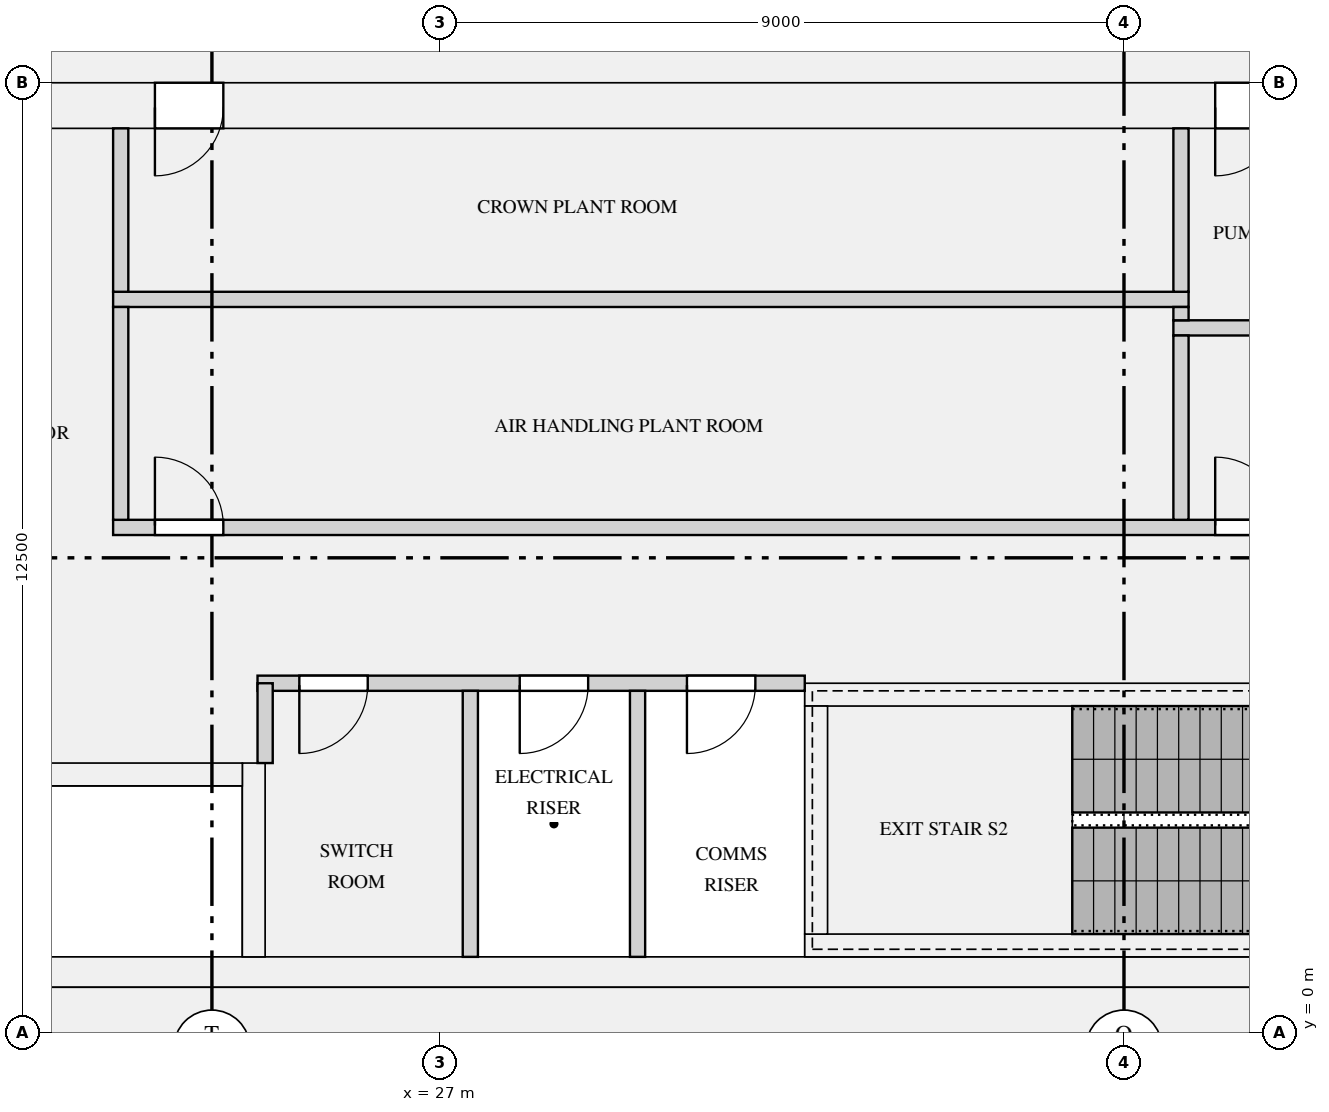
"""IFC4 building model, lengths in metres.
Left out: names, types, materials, properties, quantities, classifications, styles, units other than length and angle.
Written with IfcOpenShell. Run it as: python <this file> out.ifc"""

import sys

from ifc_helpers import new_model, si_unit, direction, frame, frame_2d, origin, place, context, subcontext, project, spatial, rectangle, extrude, element, fill, save


model = new_model("IFC4")
c1 = context("Model", 3, precision=1e-05, world=origin(), true_north=direction((0.0, 1.0)))
c2 = subcontext(c1, "Body", "Model", "MODEL_VIEW")
j1 = project(units=[si_unit("LENGTHUNIT", "METRE"), si_unit("PLANEANGLEUNIT", "RADIAN")], contexts=[c1])
p1 = place(None, origin())
s1 = spatial("IfcSite", under=j1, at=p1, CompositionType="ELEMENT")
p2 = place(p1, origin())
s2 = spatial("IfcBuilding", under=s1, at=p2, CompositionType="ELEMENT")
p3 = place(p2, frame((0.0, 0.0, 235.8)))
s3 = spatial("IfcBuildingStorey", under=s2, at=p3, CompositionType="ELEMENT", Elevation=235.8)
p4 = place(p3, frame((18.6, 0.3, 0.0), z_axis=(0.0, 0.0, 1.0), x_axis=(1.0, 0.0, 0.0)))
e1 = element("IfcWall", 1, at=p4, inside=s3, PredefinedType="SHEAR", context=c2, shape_type="SweptSolid", body=[
    extrude(rectangle(XDim=34.8, YDim=0.6, at=frame_2d((17.4, 0.0))), origin(), (0.0, 0.0, 1.0), 4.2),
])
p5 = place(p3, frame((18.6, 12.2, 0.0), z_axis=(0.0, 0.0, 1.0), x_axis=(1.0, 0.0, 0.0)))
e2 = element("IfcWall", 2, at=p5, inside=s3, PredefinedType="SHEAR", context=c2, shape_type="SweptSolid", body=[
    extrude(rectangle(XDim=34.8, YDim=0.6, at=frame_2d((17.4, 0.0))), origin(), (0.0, 0.0, 1.0), 4.2),
])
p6 = place(p5, frame((24.575, 0.0, 0.0)))
e3 = element("IfcOpeningElement", 3, at=p6, cuts=e2, PredefinedType="OPENING", context=c2, shape_type="SweptSolid", body=[
    extrude(rectangle(XDim=1.1, YDim=2.1, at=frame_2d((0.55, 1.05))), frame((0.0, 0.31, 0.0), z_axis=(0.0, -1.0, 0.0), x_axis=(1.0, 0.0, 0.0)), (0.0, 0.0, 1.0), 0.62),
])
p7 = place(p5, frame((26.825, 0.0, 0.0)))
e4 = element("IfcOpeningElement", 4, at=p7, cuts=e2, PredefinedType="OPENING", context=c2, shape_type="SweptSolid", body=[
    extrude(rectangle(XDim=1.1, YDim=2.1, at=frame_2d((0.55, 1.05))), frame((0.0, 0.31, 0.0), z_axis=(0.0, -1.0, 0.0), x_axis=(1.0, 0.0, 0.0)), (0.0, 0.0, 1.0), 0.62),
])
p8 = place(p5, frame((29.075, 0.0, 0.0)))
e5 = element("IfcOpeningElement", 5, at=p8, cuts=e2, PredefinedType="OPENING", context=c2, shape_type="SweptSolid", body=[
    extrude(rectangle(XDim=1.1, YDim=2.1, at=frame_2d((0.55, 1.05))), frame((0.0, 0.31, 0.0), z_axis=(0.0, -1.0, 0.0), x_axis=(1.0, 0.0, 0.0)), (0.0, 0.0, 1.0), 0.62),
])
p9 = place(p5, frame((18.6, 0.0, 0.0)))
e6 = element("IfcOpeningElement", 6, at=p9, cuts=e2, PredefinedType="OPENING", context=c2, shape_type="SweptSolid", body=[
    extrude(rectangle(XDim=0.9, YDim=2.1, at=frame_2d((0.45, 1.05))), frame((0.0, 0.31, 0.0), z_axis=(0.0, -1.0, 0.0), x_axis=(1.0, 0.0, 0.0)), (0.0, 0.0, 1.0), 0.62),
])
p10 = place(p5, frame((4.65, 0.0, 0.0)))
e7 = element("IfcOpeningElement", 7, at=p10, cuts=e2, PredefinedType="OPENING", context=c2, shape_type="SweptSolid", body=[
    extrude(rectangle(XDim=0.9, YDim=2.1, at=frame_2d((0.45, 1.05))), frame((0.0, 0.31, 0.0), z_axis=(0.0, -1.0, 0.0), x_axis=(1.0, 0.0, 0.0)), (0.0, 0.0, 1.0), 0.62),
])
p11 = place(p5, frame((1.55, 0.0, 0.0)))
e8 = element("IfcOpeningElement", 8, at=p11, cuts=e2, PredefinedType="OPENING", context=c2, shape_type="SweptSolid", body=[
    extrude(rectangle(XDim=1.2, YDim=2.1, at=frame_2d((0.6, 1.05))), frame((0.0, 0.31, 0.0), z_axis=(0.0, -1.0, 0.0), x_axis=(1.0, 0.0, 0.0)), (0.0, 0.0, 1.0), 0.62),
])
p12 = place(p5, frame((32.05, 0.0, 0.0)))
e9 = element("IfcOpeningElement", 9, at=p12, cuts=e2, PredefinedType="OPENING", context=c2, shape_type="SweptSolid", body=[
    extrude(rectangle(XDim=1.2, YDim=2.1, at=frame_2d((0.6, 1.05))), frame((0.0, 0.31, 0.0), z_axis=(0.0, -1.0, 0.0), x_axis=(1.0, 0.0, 0.0)), (0.0, 0.0, 1.0), 0.62),
])
p13 = place(p3, frame((18.6, 0.8, 0.0), z_axis=(0.0, 0.0, 1.0), x_axis=(1.0, 0.0, 0.0)))
e10 = element("IfcWall", 10, at=p13, inside=s3, PredefinedType="SHEAR", context=c2, shape_type="SweptSolid", body=[
    extrude(rectangle(XDim=34.8, YDim=0.4, at=frame_2d((17.4, 0.0))), origin(), (0.0, 0.0, 1.0), 4.2),
])
p14 = place(p3, frame((21.85, 3.4, 0.0), z_axis=(0.0, 0.0, 1.0), x_axis=(1.0, 0.0, 0.0)))
e11 = element("IfcWall", 11, at=p14, inside=s3, PredefinedType="SHEAR", context=c2, shape_type="SweptSolid", body=[
    extrude(rectangle(XDim=2.55, YDim=0.3, at=frame_2d((1.275, 0.0))), origin(), (0.0, 0.0, 1.0), 4.2),
])
p15 = place(p3, frame((24.55, 1.0, 0.0), z_axis=(0.0, 0.0, 1.0), x_axis=(0.0, 1.0, 0.0)))
e12 = element("IfcWall", 12, at=p15, inside=s3, PredefinedType="SHEAR", context=c2, shape_type="SweptSolid", body=[
    extrude(rectangle(XDim=2.55, YDim=0.3, at=frame_2d((1.275, 0.0))), origin(), (0.0, 0.0, 1.0), 4.2),
])
p16 = place(p3, frame((31.8, 1.15, 0.0), z_axis=(0.0, 0.0, 1.0), x_axis=(1.0, 0.0, 0.0)))
e13 = element("IfcWall", 13, at=p16, inside=s3, PredefinedType="SHEAR", context=c2, shape_type="SweptSolid", body=[
    extrude(rectangle(XDim=8.4, YDim=0.3, at=frame_2d((4.2, 0.0))), origin(), (0.0, 0.0, 1.0), 4.2),
])
p17 = place(p3, frame((31.8, 4.45, 0.0), z_axis=(0.0, 0.0, 1.0), x_axis=(1.0, 0.0, 0.0)))
e14 = element("IfcWall", 14, at=p17, inside=s3, PredefinedType="SHEAR", context=c2, shape_type="SweptSolid", body=[
    extrude(rectangle(XDim=8.4, YDim=0.3, at=frame_2d((4.2, 0.0))), origin(), (0.0, 0.0, 1.0), 4.2),
])
p18 = place(p17, frame((6.8, 0.0, 0.0)))
e15 = element("IfcOpeningElement", 15, at=p18, cuts=e14, PredefinedType="OPENING", context=c2, shape_type="SweptSolid", body=[
    extrude(rectangle(XDim=1.1, YDim=2.1, at=frame_2d((0.55, 1.05))), frame((0.0, 0.16, 0.0), z_axis=(0.0, -1.0, 0.0), x_axis=(1.0, 0.0, 0.0)), (0.0, 0.0, 1.0), 0.32),
])
p19 = place(p3, frame((31.95, 1.3, 0.0), z_axis=(0.0, 0.0, 1.0), x_axis=(0.0, 1.0, 0.0)))
e16 = element("IfcWall", 16, at=p19, inside=s3, PredefinedType="SHEAR", context=c2, shape_type="SweptSolid", body=[
    extrude(rectangle(XDim=3.0, YDim=0.3, at=frame_2d((1.5, 0.0))), origin(), (0.0, 0.0, 1.0), 4.2),
])
p20 = place(p3, frame((24.6, 4.6, 0.0), z_axis=(0.0, 0.0, 1.0), x_axis=(1.0, 0.0, 0.0)))
e17 = element("IfcWall", 17, at=p20, inside=s3, PredefinedType="PARTITIONING", context=c2, shape_type="SweptSolid", body=[
    extrude(rectangle(XDim=7.2, YDim=0.2, at=frame_2d((3.6, 0.0))), origin(), (0.0, 0.0, 1.0), 3.85),
])
p21 = place(p20, frame((0.55, 0.0, 0.0)))
e18 = element("IfcOpeningElement", 18, at=p21, cuts=e17, PredefinedType="OPENING", context=c2, shape_type="SweptSolid", body=[
    extrude(rectangle(XDim=0.9, YDim=2.1, at=frame_2d((0.45, 1.05))), frame((0.0, 0.11, 0.0), z_axis=(0.0, -1.0, 0.0), x_axis=(1.0, 0.0, 0.0)), (0.0, 0.0, 1.0), 0.22),
])
p22 = place(p20, frame((3.45, 0.0, 0.0)))
e19 = element("IfcOpeningElement", 19, at=p22, cuts=e17, PredefinedType="OPENING", context=c2, shape_type="SweptSolid", body=[
    extrude(rectangle(XDim=0.9, YDim=2.1, at=frame_2d((0.45, 1.05))), frame((0.0, 0.11, 0.0), z_axis=(0.0, -1.0, 0.0), x_axis=(1.0, 0.0, 0.0)), (0.0, 0.0, 1.0), 0.22),
])
p23 = place(p20, frame((5.65, 0.0, 0.0)))
e20 = element("IfcOpeningElement", 20, at=p23, cuts=e17, PredefinedType="OPENING", context=c2, shape_type="SweptSolid", body=[
    extrude(rectangle(XDim=0.9, YDim=2.1, at=frame_2d((0.45, 1.05))), frame((0.0, 0.11, 0.0), z_axis=(0.0, -1.0, 0.0), x_axis=(1.0, 0.0, 0.0)), (0.0, 0.0, 1.0), 0.22),
])
p24 = place(p3, frame((22.7, 6.65, 0.0), z_axis=(0.0, 0.0, 1.0), x_axis=(1.0, 0.0, 0.0)))
e21 = element("IfcWall", 21, at=p24, inside=s3, PredefinedType="PARTITIONING", context=c2, shape_type="SweptSolid", body=[
    extrude(rectangle(XDim=19.85, YDim=0.2, at=frame_2d((9.925, 0.0))), origin(), (0.0, 0.0, 1.0), 3.85),
])
p25 = place(p24, frame((14.5, 0.0, 0.0)))
e22 = element("IfcOpeningElement", 22, at=p25, cuts=e21, PredefinedType="OPENING", context=c2, shape_type="SweptSolid", body=[
    extrude(rectangle(XDim=0.9, YDim=2.1, at=frame_2d((0.45, 1.05))), frame((0.0, 0.11, 0.0), z_axis=(0.0, -1.0, 0.0), x_axis=(1.0, 0.0, 0.0)), (0.0, 0.0, 1.0), 0.22),
])
p26 = place(p24, frame((0.55, 0.0, 0.0)))
e23 = element("IfcOpeningElement", 23, at=p26, cuts=e21, PredefinedType="OPENING", context=c2, shape_type="SweptSolid", body=[
    extrude(rectangle(XDim=0.9, YDim=2.1, at=frame_2d((0.45, 1.05))), frame((0.0, 0.11, 0.0), z_axis=(0.0, -1.0, 0.0), x_axis=(1.0, 0.0, 0.0)), (0.0, 0.0, 1.0), 0.22),
])
p27 = place(p3, frame((36.65, 9.275, 0.0), z_axis=(0.0, 0.0, 1.0), x_axis=(1.0, 0.0, 0.0)))
e24 = element("IfcWall", 24, at=p27, inside=s3, PredefinedType="PARTITIONING", context=c2, shape_type="SweptSolid", body=[
    extrude(rectangle(XDim=5.8, YDim=0.2, at=frame_2d((2.9, 0.0))), origin(), (0.0, 0.0, 1.0), 3.85),
])
p28 = place(p3, frame((22.7, 9.65, 0.0), z_axis=(0.0, 0.0, 1.0), x_axis=(1.0, 0.0, 0.0)))
e25 = element("IfcWall", 25, at=p28, inside=s3, PredefinedType="PARTITIONING", context=c2, shape_type="SweptSolid", body=[
    extrude(rectangle(XDim=14.15, YDim=0.2, at=frame_2d((7.075, 0.0))), origin(), (0.0, 0.0, 1.0), 3.85),
])
for number, where, z_axis, x_axis in (
    (26, (27.4, 1.0, 0.0), (0.0, 0.0, 1.0), (0.0, 1.0, 0.0)),
    (27, (29.6, 1.0, 0.0), (0.0, 0.0, 1.0), (0.0, 1.0, 0.0)),
):
    element("IfcWall", number, at=place(p3, frame(where, z_axis=z_axis, x_axis=x_axis)), inside=s3, PredefinedType="PARTITIONING", context=c2, shape_type="SweptSolid", body=[
        extrude(rectangle(XDim=3.5, YDim=0.2, at=frame_2d((1.75, 0.0))), origin(), (0.0, 0.0, 1.0), 3.85),
    ])
p29 = place(p3, frame((24.7, 3.55, 0.0), z_axis=(0.0, 0.0, 1.0), x_axis=(0.0, 1.0, 0.0)))
e28 = element("IfcWall", 28, at=p29, inside=s3, PredefinedType="PARTITIONING", context=c2, shape_type="SweptSolid", body=[
    extrude(rectangle(XDim=1.05, YDim=0.2, at=frame_2d((0.525, 0.0))), origin(), (0.0, 0.0, 1.0), 3.85),
])
p30 = place(p3, frame((22.8, 6.75, 0.0), z_axis=(0.0, 0.0, 1.0), x_axis=(0.0, 1.0, 0.0)))
e29 = element("IfcWall", 29, at=p30, inside=s3, PredefinedType="PARTITIONING", context=c2, shape_type="SweptSolid", body=[
    extrude(rectangle(XDim=2.8, YDim=0.2, at=frame_2d((1.4, 0.0))), origin(), (0.0, 0.0, 1.0), 3.85),
])
p31 = place(p3, frame((36.75, 6.75, 0.0), z_axis=(0.0, 0.0, 1.0), x_axis=(0.0, 1.0, 0.0)))
e30 = element("IfcWall", 30, at=p31, inside=s3, PredefinedType="PARTITIONING", context=c2, shape_type="SweptSolid", body=[
    extrude(rectangle(XDim=2.425, YDim=0.2, at=frame_2d((1.212, 0.0))), origin(), (0.0, 0.0, 1.0), 3.85),
])
p32 = place(p3, frame((36.75, 9.375, 0.0), z_axis=(0.0, 0.0, 1.0), x_axis=(0.0, 1.0, 0.0)))
e31 = element("IfcWall", 31, at=p32, inside=s3, PredefinedType="PARTITIONING", context=c2, shape_type="SweptSolid", body=[
    extrude(rectangle(XDim=0.175, YDim=0.2, at=frame_2d((0.087, 0.0))), origin(), (0.0, 0.0, 1.0), 3.85),
])
for number, where, z_axis, x_axis in (
    (32, (22.8, 9.75, 0.0), (0.0, 0.0, 1.0), (0.0, 1.0, 0.0)),
    (33, (36.75, 9.75, 0.0), (0.0, 0.0, 1.0), (0.0, 1.0, 0.0)),
):
    element("IfcWall", number, at=place(p3, frame(where, z_axis=z_axis, x_axis=x_axis)), inside=s3, PredefinedType="PARTITIONING", context=c2, shape_type="SweptSolid", body=[
        extrude(rectangle(XDim=2.15, YDim=0.2, at=frame_2d((1.075, 0.0))), origin(), (0.0, 0.0, 1.0), 3.85),
    ])
p33 = place(p21, frame((0.9, 0.0, 0.0), z_axis=(0.0, 0.0, 1.0), x_axis=(-1.0, 0.0, 0.0)))
e34 = element("IfcDoor", 34, at=p33, inside=s3, OperationType="SINGLE_SWING_RIGHT", PredefinedType="DOOR", context=c2, shape_type="SweptSolid", body=[
    extrude(rectangle(XDim=0.9, YDim=2.1, at=frame_2d((0.45, 1.05))), frame((0.0, 0.025, 0.0), z_axis=(0.0, -1.0, 0.0), x_axis=(1.0, 0.0, 0.0)), (0.0, 0.0, 1.0), 0.05),
])
fill(e18, e34)
p34 = place(p25, origin())
e35 = element("IfcDoor", 35, at=p34, inside=s3, OperationType="SINGLE_SWING_LEFT", PredefinedType="DOOR", context=c2, shape_type="SweptSolid", body=[
    extrude(rectangle(XDim=0.9, YDim=2.1, at=frame_2d((0.45, 1.05))), frame((0.0, 0.025, 0.0), z_axis=(0.0, -1.0, 0.0), x_axis=(1.0, 0.0, 0.0)), (0.0, 0.0, 1.0), 0.05),
])
fill(e22, e35)
p35 = place(p9, frame((0.9, 0.0, 0.0), z_axis=(0.0, 0.0, 1.0), x_axis=(-1.0, 0.0, 0.0)))
e36 = element("IfcDoor", 36, at=p35, inside=s3, OperationType="SINGLE_SWING_RIGHT", PredefinedType="DOOR", context=c2, shape_type="SweptSolid", body=[
    extrude(rectangle(XDim=0.9, YDim=2.1, at=frame_2d((0.45, 1.05))), frame((0.0, 0.025, 0.0), z_axis=(0.0, -1.0, 0.0), x_axis=(1.0, 0.0, 0.0)), (0.0, 0.0, 1.0), 0.05),
])
fill(e6, e36)
p36 = place(p10, frame((0.9, 0.0, 0.0), z_axis=(0.0, 0.0, 1.0), x_axis=(-1.0, 0.0, 0.0)))
e37 = element("IfcDoor", 37, at=p36, inside=s3, OperationType="SINGLE_SWING_RIGHT", PredefinedType="DOOR", context=c2, shape_type="SweptSolid", body=[
    extrude(rectangle(XDim=0.9, YDim=2.1, at=frame_2d((0.45, 1.05))), frame((0.0, 0.025, 0.0), z_axis=(0.0, -1.0, 0.0), x_axis=(1.0, 0.0, 0.0)), (0.0, 0.0, 1.0), 0.05),
])
fill(e7, e37)
p37 = place(p26, origin())
e38 = element("IfcDoor", 38, at=p37, inside=s3, OperationType="SINGLE_SWING_LEFT", PredefinedType="DOOR", context=c2, shape_type="SweptSolid", body=[
    extrude(rectangle(XDim=0.9, YDim=2.1, at=frame_2d((0.45, 1.05))), frame((0.0, 0.025, 0.0), z_axis=(0.0, -1.0, 0.0), x_axis=(1.0, 0.0, 0.0)), (0.0, 0.0, 1.0), 0.05),
])
fill(e23, e38)
p38 = place(p22, frame((0.9, 0.0, 0.0), z_axis=(0.0, 0.0, 1.0), x_axis=(-1.0, 0.0, 0.0)))
e39 = element("IfcDoor", 39, at=p38, inside=s3, OperationType="SINGLE_SWING_RIGHT", PredefinedType="DOOR", context=c2, shape_type="SweptSolid", body=[
    extrude(rectangle(XDim=0.9, YDim=2.1, at=frame_2d((0.45, 1.05))), frame((0.0, 0.025, 0.0), z_axis=(0.0, -1.0, 0.0), x_axis=(1.0, 0.0, 0.0)), (0.0, 0.0, 1.0), 0.05),
])
fill(e19, e39)
p39 = place(p23, frame((0.9, 0.0, 0.0), z_axis=(0.0, 0.0, 1.0), x_axis=(-1.0, 0.0, 0.0)))
e40 = element("IfcDoor", 40, at=p39, inside=s3, OperationType="SINGLE_SWING_RIGHT", PredefinedType="DOOR", context=c2, shape_type="SweptSolid", body=[
    extrude(rectangle(XDim=0.9, YDim=2.1, at=frame_2d((0.45, 1.05))), frame((0.0, 0.025, 0.0), z_axis=(0.0, -1.0, 0.0), x_axis=(1.0, 0.0, 0.0)), (0.0, 0.0, 1.0), 0.05),
])
fill(e20, e40)
save(model, sys.argv[1])
